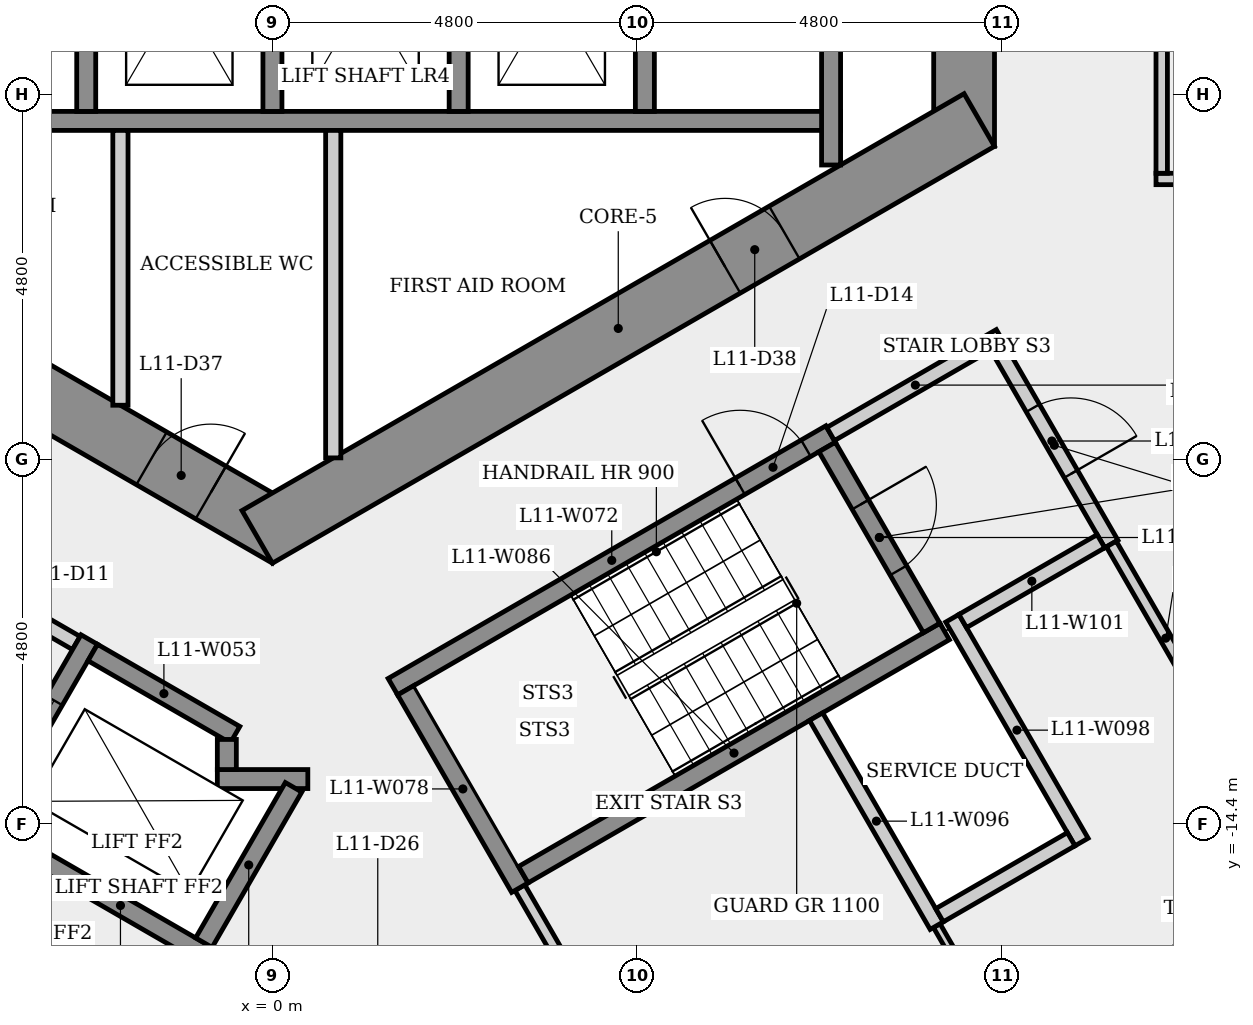
"""IFC4 building model, lengths in metres.
Left out: names, types, materials, properties, quantities, classifications, styles, units other than length and angle.
Written with IfcOpenShell. Run it as: python <this file> out.ifc"""

import sys

from ifc_helpers import new_model, si_unit, direction, frame, frame_2d, origin, origin_2d, place, context, subcontext, project, spatial, rectangle, extrude, element, fill, save


model = new_model("IFC4")
c1 = context("Model", 3, precision=1e-05, world=origin(), true_north=direction((0.0, 1.0)))
c2 = subcontext(c1, "Body", "Model", "MODEL_VIEW")
j1 = project(units=[si_unit("LENGTHUNIT", "METRE"), si_unit("PLANEANGLEUNIT", "RADIAN")], contexts=[c1])
p1 = place(None, origin())
s1 = spatial("IfcSite", under=j1, at=p1, CompositionType="ELEMENT")
p2 = place(p1, origin())
s2 = spatial("IfcBuilding", under=s1, at=p2, CompositionType="ELEMENT")
p3 = place(p2, frame((0.0, 0.0, 45.9)))
s3 = spatial("IfcBuildingStorey", under=s2, at=p3, CompositionType="ELEMENT", Elevation=45.9)
p4 = place(p3, frame((9.1, -5.485, 0.0), z_axis=(0.0, 0.0, 1.0), x_axis=(0.0, 1.0, 0.0)))
e1 = element("IfcWall", 1, at=p4, inside=s3, PredefinedType="SHEAR", context=c2, shape_type="SweptSolid", body=[
    extrude(rectangle(XDim=10.97, YDim=0.8, at=frame_2d((5.485, 0.0))), origin(), (0.0, 0.0, 1.0), 3.4),
])
p5 = place(p4, frame((4.685, 0.0, 0.0)))
e2 = element("IfcOpeningElement", 2, at=p5, cuts=e1, PredefinedType="OPENING", context=c2, shape_type="SweptSolid", body=[
    extrude(rectangle(XDim=1.6, YDim=2.1, at=frame_2d((0.8, 1.05))), frame((0.0, 0.41, 0.0), z_axis=(0.0, -1.0, 0.0), x_axis=(1.0, 0.0, 0.0)), (0.0, 0.0, 1.0), 0.82),
])
p6 = place(p3, frame((-9.3, -5.138, 0.0), z_axis=(0.0, 0.0, 1.0), x_axis=(0.866023993627, -0.500002442456, 0.0)))
e3 = element("IfcWall", 3, at=p6, inside=s3, PredefinedType="SHEAR", context=c2, shape_type="SweptSolid", body=[
    extrude(rectangle(XDim=10.97, YDim=0.8, at=frame_2d((5.485, 0.0))), origin(), (0.0, 0.0, 1.0), 3.4),
])
p7 = place(p6, frame((2.268, 0.0, 0.0)))
e4 = element("IfcOpeningElement", 4, at=p7, cuts=e3, PredefinedType="OPENING", context=c2, shape_type="SweptSolid", body=[
    extrude(rectangle(XDim=0.9, YDim=2.1, at=frame_2d((0.45, 1.05))), frame((0.0, 0.41, 0.0), z_axis=(0.0, -1.0, 0.0), x_axis=(1.0, 0.0, 0.0)), (0.0, 0.0, 1.0), 0.82),
])
p8 = place(p6, frame((8.903, 0.0, 0.0)))
e5 = element("IfcOpeningElement", 5, at=p8, cuts=e3, PredefinedType="OPENING", context=c2, shape_type="SweptSolid", body=[
    extrude(rectangle(XDim=0.9, YDim=2.1, at=frame_2d((0.45, 1.05))), frame((0.0, 0.41, 0.0), z_axis=(0.0, -1.0, 0.0), x_axis=(1.0, 0.0, 0.0)), (0.0, 0.0, 1.0), 0.82),
])
p9 = place(p3, frame((-0.2, -10.623, 0.0), z_axis=(0.0, 0.0, 1.0), x_axis=(0.866023993627, 0.500002442456, 0.0)))
e6 = element("IfcWall", 6, at=p9, inside=s3, PredefinedType="SHEAR", context=c2, shape_type="SweptSolid", body=[
    extrude(rectangle(XDim=10.97, YDim=0.8, at=frame_2d((5.485, 0.0))), origin(), (0.0, 0.0, 1.0), 3.4),
])
p10 = place(p9, frame((7.108, 0.0, 0.0)))
e7 = element("IfcOpeningElement", 7, at=p10, cuts=e6, PredefinedType="OPENING", context=c2, shape_type="SweptSolid", body=[
    extrude(rectangle(XDim=0.9, YDim=2.1, at=frame_2d((0.45, 1.05))), frame((0.0, 0.41, 0.0), z_axis=(0.0, -1.0, 0.0), x_axis=(1.0, 0.0, 0.0)), (0.0, 0.0, 1.0), 0.82),
])
p11 = place(p3, frame((12.016, -16.617, 0.0), z_axis=(0.0, 0.0, 1.0), x_axis=(0.5, -0.866025403784, 0.0)))
e8 = element("IfcColumn", 8, at=p11, inside=s3, PredefinedType="COLUMN", context=c2, shape_type="SweptSolid", body=[
    extrude(rectangle(XDim=1.2, YDim=1.2, at=origin_2d()), origin(), (0.0, 0.0, 1.0), 3.4),
])
p12 = place(p3, frame((-6.435, -9.795, 0.0), z_axis=(0.0, 0.0, 1.0), x_axis=(0.866012907634, -0.500021643343, 0.0)))
e9 = element("IfcWall", 9, at=p12, inside=s3, PredefinedType="PARTITIONING", context=c2, shape_type="SweptSolid", body=[
    extrude(rectangle(XDim=4.45, YDim=0.2, at=frame_2d((2.225, 0.0))), origin(), (0.0, 0.0, 1.0), 3.05),
])
p13 = place(p12, frame((1.675, 0.0, 0.0)))
e10 = element("IfcOpeningElement", 10, at=p13, cuts=e9, PredefinedType="OPENING", context=c2, shape_type="SweptSolid", body=[
    extrude(rectangle(XDim=1.1, YDim=2.1, at=frame_2d((0.55, 1.05))), frame((0.0, 0.11, 0.0), z_axis=(0.0, -1.0, 0.0), x_axis=(1.0, 0.0, 0.0)), (0.0, 0.0, 1.0), 0.22),
])
p14 = place(p3, frame((-7.225, -5.15, 0.0), z_axis=(0.0, 0.0, 1.0), x_axis=(1.0, 0.0, 0.0)))
e11 = element("IfcWall", 11, at=p14, inside=s3, PredefinedType="SHEAR", context=c2, shape_type="SweptSolid", body=[
    extrude(rectangle(XDim=14.7, YDim=0.25, at=frame_2d((7.35, 0.0))), origin(), (0.0, 0.0, 1.0), 3.05),
])
p15 = place(p3, frame((-2.41, -11.974, 0.0), z_axis=(0.0, 0.0, 1.0), x_axis=(-0.500001826776, -0.866024349092, 0.0)))
e12 = element("IfcWall", 12, at=p15, inside=s3, PredefinedType="SHEAR", context=c2, shape_type="SweptSolid", body=[
    extrude(rectangle(XDim=2.95, YDim=0.25, at=frame_2d((1.475, 0.0))), origin(), (0.0, 0.0, 1.0), 3.05),
])
p16 = place(p15, frame((0.925, 0.0, 0.0)))
e13 = element("IfcOpeningElement", 13, at=p16, cuts=e12, PredefinedType="OPENING", context=c2, shape_type="SweptSolid", body=[
    extrude(rectangle(XDim=1.1, YDim=2.1, at=frame_2d((0.55, 1.05))), frame((0.0, 0.135, 0.0), z_axis=(0.0, -1.0, 0.0), x_axis=(1.0, 0.0, 0.0)), (0.0, 0.0, 1.0), 0.27),
])
p17 = place(p3, frame((-2.364, -12.145, 0.0), z_axis=(0.0, 0.0, 1.0), x_axis=(0.86603892542, -0.499976579108, 0.0)))
e14 = element("IfcWall", 14, at=p17, inside=s3, PredefinedType="SHEAR", context=c2, shape_type="SweptSolid", body=[
    extrude(rectangle(XDim=2.162, YDim=0.25, at=frame_2d((1.081, 0.0))), origin(), (0.0, 0.0, 1.0), 3.05),
])
p18 = place(p3, frame((-2.45, -1.925, 0.0), z_axis=(0.0, 0.0, 1.0), x_axis=(0.0, -1.0, 0.0)))
e15 = element("IfcWall", 15, at=p18, inside=s3, PredefinedType="SHEAR", context=c2, shape_type="SweptSolid", body=[
    extrude(rectangle(XDim=3.1, YDim=0.25, at=frame_2d((1.55, 0.0))), origin(), (0.0, 0.0, 1.0), 3.4),
])
p19 = place(p3, frame((-2.0, -5.275, 0.0), z_axis=(0.0, 0.0, 1.0), x_axis=(0.0, -1.0, 0.0)))
e16 = element("IfcWall", 16, at=p19, inside=s3, PredefinedType="PARTITIONING", context=c2, shape_type="SweptSolid", body=[
    extrude(rectangle(XDim=3.616, YDim=0.2, at=frame_2d((1.808, 0.0))), origin(), (0.0, 0.0, 1.0), 3.05),
])
p20 = place(p3, frame((-0.856, -16.133, 0.0), z_axis=(0.0, 0.0, 1.0), x_axis=(-0.866021716278, 0.500006386895, 0.0)))
e17 = element("IfcWall", 17, at=p20, inside=s3, PredefinedType="SHEAR", context=c2, shape_type="SweptSolid", body=[
    extrude(rectangle(XDim=3.3, YDim=0.25, at=frame_2d((1.65, 0.0))), origin(), (0.0, 0.0, 1.0), 3.05),
])
p21 = place(p3, frame((-0.725, -13.81, 0.0), z_axis=(0.0, 0.0, 1.0), x_axis=(1.0, 0.0, 0.0)))
e18 = element("IfcWall", 18, at=p21, inside=s3, PredefinedType="SHEAR", context=c2, shape_type="SweptSolid", body=[
    extrude(rectangle(XDim=1.191, YDim=0.25, at=frame_2d((0.595, 0.0))), origin(), (0.0, 0.0, 1.0), 3.05),
])
p22 = place(p3, frame((-0.6, -13.289, 0.0), z_axis=(0.0, 0.0, 1.0), x_axis=(0.0, -1.0, 0.0)))
e19 = element("IfcWall", 19, at=p22, inside=s3, PredefinedType="SHEAR", context=c2, shape_type="SweptSolid", body=[
    extrude(rectangle(XDim=0.396, YDim=0.25, at=frame_2d((0.198, 0.0))), origin(), (0.0, 0.0, 1.0), 3.4),
])
p23 = place(p3, frame((0.0, -1.925, 0.0), z_axis=(0.0, 0.0, 1.0), x_axis=(0.0, -1.0, 0.0)))
e20 = element("IfcWall", 20, at=p23, inside=s3, PredefinedType="SHEAR", context=c2, shape_type="SweptSolid", body=[
    extrude(rectangle(XDim=3.1, YDim=0.25, at=frame_2d((1.55, 0.0))), origin(), (0.0, 0.0, 1.0), 3.4),
])
p24 = place(p3, frame((0.278, -13.918, 0.0), z_axis=(0.0, 0.0, 1.0), x_axis=(-0.49998806882, -0.866032292145, 0.0)))
e21 = element("IfcWall", 21, at=p24, inside=s3, PredefinedType="SHEAR", context=c2, shape_type="SweptSolid", body=[
    extrude(rectangle(XDim=2.36, YDim=0.25, at=frame_2d((1.18, 0.0))), origin(), (0.0, 0.0, 1.0), 3.4),
])
p25 = place(p3, frame((0.8, -5.275, 0.0), z_axis=(0.0, 0.0, 1.0), x_axis=(0.0, -1.0, 0.0)))
e22 = element("IfcWall", 22, at=p25, inside=s3, PredefinedType="PARTITIONING", context=c2, shape_type="SweptSolid", body=[
    extrude(rectangle(XDim=4.309, YDim=0.2, at=frame_2d((2.155, 0.0))), origin(), (0.0, 0.0, 1.0), 3.05),
])
p26 = place(p3, frame((1.585, -12.595, 0.0), z_axis=(0.0, 0.0, 1.0), x_axis=(0.866036417653, 0.499980922934, 0.0)))
e23 = element("IfcWall", 23, at=p26, inside=s3, PredefinedType="SHEAR", context=c2, shape_type="SweptSolid", body=[
    extrude(rectangle(XDim=6.65, YDim=0.25, at=frame_2d((3.325, 0.0))), origin(), (0.0, 0.0, 1.0), 3.05),
])
p27 = place(p26, frame((5.275, 0.0, 0.0)))
e24 = element("IfcOpeningElement", 24, at=p27, cuts=e23, PredefinedType="OPENING", context=c2, shape_type="SweptSolid", body=[
    extrude(rectangle(XDim=1.0, YDim=2.1, at=frame_2d((0.5, 1.05))), frame((0.0, 0.135, 0.0), z_axis=(0.0, -1.0, 0.0), x_axis=(1.0, 0.0, 0.0)), (0.0, 0.0, 1.0), 0.27),
])
p28 = place(p3, frame((2.45, -1.925, 0.0), z_axis=(0.0, 0.0, 1.0), x_axis=(0.0, -1.0, 0.0)))
e25 = element("IfcWall", 25, at=p28, inside=s3, PredefinedType="SHEAR", context=c2, shape_type="SweptSolid", body=[
    extrude(rectangle(XDim=3.1, YDim=0.25, at=frame_2d((1.55, 0.0))), origin(), (0.0, 0.0, 1.0), 3.4),
])
p29 = place(p3, frame((3.256, -15.239, 0.0), z_axis=(0.0, 0.0, 1.0), x_axis=(0.499990325971, -0.866030989016, 0.0)))
e26 = element("IfcWall", 26, at=p29, inside=s3, PredefinedType="PARTITIONING", context=c2, shape_type="SweptSolid", body=[
    extrude(rectangle(XDim=1.104, YDim=0.15, at=frame_2d((0.552, 0.0))), origin(), (0.0, 0.0, 1.0), 3.05),
])
p30 = place(p3, frame((3.256, -15.239, 0.0), z_axis=(0.0, 0.0, 1.0), x_axis=(-0.50002537861, 0.866010750942, 0.0)))
e27 = element("IfcWall", 27, at=p30, inside=s3, PredefinedType="SHEAR", context=c2, shape_type="SweptSolid", body=[
    extrude(rectangle(XDim=3.0, YDim=0.25, at=frame_2d((1.5, 0.0))), origin(), (0.0, 0.0, 1.0), 3.05),
])
p31 = place(p3, frame((4.9, -1.925, 0.0), z_axis=(0.0, 0.0, 1.0), x_axis=(0.0, -1.0, 0.0)))
e28 = element("IfcWall", 28, at=p31, inside=s3, PredefinedType="SHEAR", context=c2, shape_type="SweptSolid", body=[
    extrude(rectangle(XDim=3.1, YDim=0.25, at=frame_2d((1.55, 0.0))), origin(), (0.0, 0.0, 1.0), 3.4),
])
p32 = place(p3, frame((3.301, -15.068, 0.0), z_axis=(0.0, 0.0, 1.0), x_axis=(0.866035036182, 0.499983315828, 0.0)))
e29 = element("IfcWall", 29, at=p32, inside=s3, PredefinedType="SHEAR", context=c2, shape_type="SweptSolid", body=[
    extrude(rectangle(XDim=6.4, YDim=0.25, at=frame_2d((3.2, 0.0))), origin(), (0.0, 0.0, 1.0), 3.05),
])
p33 = place(p3, frame((7.298, -9.441, 0.0), z_axis=(0.0, 0.0, 1.0), x_axis=(0.500034990121, -0.866005201286, 0.0)))
e30 = element("IfcWall", 30, at=p33, inside=s3, PredefinedType="SHEAR", context=c2, shape_type="SweptSolid", body=[
    extrude(rectangle(XDim=2.75, YDim=0.25, at=frame_2d((1.375, 0.0))), origin(), (0.0, 0.0, 1.0), 3.05),
])
p34 = place(p33, frame((0.875, 0.0, 0.0)))
e31 = element("IfcOpeningElement", 31, at=p34, cuts=e30, PredefinedType="OPENING", context=c2, shape_type="SweptSolid", body=[
    extrude(rectangle(XDim=1.0, YDim=2.1, at=frame_2d((0.5, 1.05))), frame((0.0, 0.135, 0.0), z_axis=(0.0, -1.0, 0.0), x_axis=(1.0, 0.0, 0.0)), (0.0, 0.0, 1.0), 0.27),
])
p35 = place(p3, frame((7.344, -9.27, 0.0), z_axis=(0.0, 0.0, 1.0), x_axis=(0.866005588531, 0.500034319456, 0.0)))
e32 = element("IfcWall", 32, at=p35, inside=s3, PredefinedType="PARTITIONING", context=c2, shape_type="SweptSolid", body=[
    extrude(rectangle(XDim=2.575, YDim=0.2, at=frame_2d((1.288, 0.0))), origin(), (0.0, 0.0, 1.0), 3.05),
])
p36 = place(p3, frame((7.35, -1.925, 0.0), z_axis=(0.0, 0.0, 1.0), x_axis=(0.0, -1.0, 0.0)))
e33 = element("IfcWall", 33, at=p36, inside=s3, PredefinedType="SHEAR", context=c2, shape_type="SweptSolid", body=[
    extrude(rectangle(XDim=3.805, YDim=0.25, at=frame_2d((1.903, 0.0))), origin(), (0.0, 0.0, 1.0), 3.05),
])
p37 = place(p3, frame((8.74, -15.738, 0.0), z_axis=(0.0, 0.0, 1.0), x_axis=(0.500001913541, -0.866024298998, 0.0)))
e34 = element("IfcWall", 34, at=p37, inside=s3, PredefinedType="PARTITIONING", context=c2, shape_type="SweptSolid", body=[
    extrude(rectangle(XDim=3.025, YDim=0.1, at=frame_2d((1.512, 0.0))), origin(), (0.0, 0.0, 1.0), 3.05),
])
p38 = place(p3, frame((8.74, -15.739, 0.0), z_axis=(0.0, 0.0, 1.0), x_axis=(-0.500017526161, 0.866015284814, 0.0)))
e35 = element("IfcWall", 35, at=p38, inside=s3, PredefinedType="PLUMBINGWALL", context=c2, shape_type="SweptSolid", body=[
    extrude(rectangle(XDim=3.175, YDim=0.2, at=frame_2d((1.588, 0.0))), origin(), (0.0, 0.0, 1.0), 3.05),
])
p39 = place(p3, frame((8.945, -11.694, 0.0), z_axis=(0.0, 0.0, 1.0), x_axis=(0.500062241894, -0.865989465428, 0.0)))
e36 = element("IfcWall", 36, at=p39, inside=s3, PredefinedType="PLUMBINGWALL", context=c2, shape_type="SweptSolid", body=[
    extrude(rectangle(XDim=3.4, YDim=0.2, at=frame_2d((1.7, 0.0))), origin(), (0.0, 0.0, 1.0), 3.05),
])
p40 = place(p3, frame((9.537, -8.119, 0.0), z_axis=(0.0, 0.0, 1.0), x_axis=(0.499990139034, -0.866031096941, 0.0)))
e37 = element("IfcWall", 37, at=p40, inside=s3, PredefinedType="PARTITIONING", context=c2, shape_type="SweptSolid", body=[
    extrude(rectangle(XDim=3.0, YDim=0.2, at=frame_2d((1.5, 0.0))), origin(), (0.0, 0.0, 1.0), 3.05),
])
p41 = place(p40, frame((0.935, 0.0, 0.0)))
e38 = element("IfcOpeningElement", 38, at=p41, cuts=e37, PredefinedType="OPENING", context=c2, shape_type="SweptSolid", body=[
    extrude(rectangle(XDim=1.0, YDim=2.1, at=frame_2d((0.5, 1.05))), frame((0.0, 0.11, 0.0), z_axis=(0.0, -1.0, 0.0), x_axis=(1.0, 0.0, 0.0)), (0.0, 0.0, 1.0), 0.22),
])
p42 = place(p3, frame((10.509, -14.602, 0.0), z_axis=(0.0, 0.0, 1.0), x_axis=(-0.866010750942, -0.50002537861, 0.0)))
e39 = element("IfcWall", 39, at=p42, inside=s3, PredefinedType="PLUMBINGWALL", context=c2, shape_type="SweptSolid", body=[
    extrude(rectangle(XDim=2.0, YDim=0.2, at=frame_2d((1.0, 0.0))), origin(), (0.0, 0.0, 1.0), 3.05),
])
p43 = place(p3, frame((10.901, -10.681, 0.0), z_axis=(0.0, 0.0, 1.0), x_axis=(-0.866009402589, -0.500027713859, 0.0)))
e40 = element("IfcWall", 40, at=p43, inside=s3, PredefinedType="PARTITIONING", context=c2, shape_type="SweptSolid", body=[
    extrude(rectangle(XDim=2.1, YDim=0.2, at=frame_2d((1.05, 0.0))), origin(), (0.0, 0.0, 1.0), 3.05),
])
p44 = place(p3, frame((11.625, -5.914, 0.0), z_axis=(0.0, 0.0, 1.0), x_axis=(1.0, 0.0, 0.0)))
e41 = element("IfcWall", 41, at=p44, inside=s3, PredefinedType="PARTITIONING", context=c2, shape_type="SweptSolid", body=[
    extrude(rectangle(XDim=5.047, YDim=0.15, at=frame_2d((2.523, 0.0))), origin(), (0.0, 0.0, 1.0), 3.05),
])
p45 = place(p3, frame((11.7, 5.914, 0.0), z_axis=(0.0, 0.0, 1.0), x_axis=(0.0, -1.0, 0.0)))
e42 = element("IfcWall", 42, at=p45, inside=s3, PredefinedType="PARTITIONING", context=c2, shape_type="SweptSolid", body=[
    extrude(rectangle(XDim=11.753, YDim=0.15, at=frame_2d((5.877, 0.0))), origin(), (0.0, 0.0, 1.0), 3.05),
])
p46 = place(p45, frame((5.377, 0.0, 0.0)))
e43 = element("IfcOpeningElement", 43, at=p46, cuts=e42, PredefinedType="OPENING", context=c2, shape_type="SweptSolid", body=[
    extrude(rectangle(XDim=1.0, YDim=2.1, at=frame_2d((0.5, 1.05))), frame((0.0, 0.085, 0.0), z_axis=(0.0, -1.0, 0.0), x_axis=(1.0, 0.0, 0.0)), (0.0, 0.0, 1.0), 0.17),
])
p47 = place(p3, frame((12.468, -13.195, 0.0), z_axis=(0.0, 0.0, 1.0), x_axis=(-0.499956322556, 0.8660506195, 0.0)))
e44 = element("IfcWall", 44, at=p47, inside=s3, PredefinedType="PARTITIONING", context=c2, shape_type="SweptSolid", body=[
    extrude(rectangle(XDim=2.862, YDim=0.15, at=frame_2d((1.431, 0.0))), origin(), (0.0, 0.0, 1.0), 3.05),
])
p48 = place(p16, origin())
e45 = element("IfcDoor", 45, at=p48, inside=s3, OperationType="SLIDING_TO_LEFT", PredefinedType="DOOR", context=c2, shape_type="SweptSolid", body=[
    extrude(rectangle(XDim=1.1, YDim=2.1, at=frame_2d((0.55, 1.05))), frame((0.0, 0.025, 0.0), z_axis=(0.0, -1.0, 0.0), x_axis=(1.0, 0.0, 0.0)), (0.0, 0.0, 1.0), 0.05),
])
fill(e13, e45)
p49 = place(p27, origin())
e46 = element("IfcDoor", 46, at=p49, inside=s3, OperationType="SINGLE_SWING_LEFT", PredefinedType="DOOR", context=c2, shape_type="SweptSolid", body=[
    extrude(rectangle(XDim=1.0, YDim=2.1, at=frame_2d((0.5, 1.05))), frame((0.0, 0.025, 0.0), z_axis=(0.0, -1.0, 0.0), x_axis=(1.0, 0.0, 0.0)), (0.0, 0.0, 1.0), 0.05),
])
fill(e24, e46)
p50 = place(p41, origin())
e47 = element("IfcDoor", 47, at=p50, inside=s3, OperationType="SINGLE_SWING_RIGHT", PredefinedType="DOOR", context=c2, shape_type="SweptSolid", body=[
    extrude(rectangle(XDim=1.0, YDim=2.1, at=frame_2d((0.5, 1.05))), frame((0.0, 0.025, 0.0), z_axis=(0.0, -1.0, 0.0), x_axis=(1.0, 0.0, 0.0)), (0.0, 0.0, 1.0), 0.05),
])
fill(e38, e47)
p51 = place(p34, origin())
e48 = element("IfcDoor", 48, at=p51, inside=s3, OperationType="SINGLE_SWING_LEFT", PredefinedType="DOOR", context=c2, shape_type="SweptSolid", body=[
    extrude(rectangle(XDim=1.0, YDim=2.1, at=frame_2d((0.5, 1.05))), frame((0.0, 0.025, 0.0), z_axis=(0.0, -1.0, 0.0), x_axis=(1.0, 0.0, 0.0)), (0.0, 0.0, 1.0), 0.05),
])
fill(e31, e48)
p52 = place(p8, origin())
e49 = element("IfcDoor", 49, at=p52, inside=s3, OperationType="SINGLE_SWING_RIGHT", PredefinedType="DOOR", context=c2, shape_type="SweptSolid", body=[
    extrude(rectangle(XDim=0.9, YDim=2.1, at=frame_2d((0.45, 1.05))), frame((0.0, 0.025, 0.0), z_axis=(0.0, -1.0, 0.0), x_axis=(1.0, 0.0, 0.0)), (0.0, 0.0, 1.0), 0.05),
])
fill(e5, e49)
p53 = place(p10, origin())
e50 = element("IfcDoor", 50, at=p53, inside=s3, OperationType="SINGLE_SWING_LEFT", PredefinedType="DOOR", context=c2, shape_type="SweptSolid", body=[
    extrude(rectangle(XDim=0.9, YDim=2.1, at=frame_2d((0.45, 1.05))), frame((0.0, 0.025, 0.0), z_axis=(0.0, -1.0, 0.0), x_axis=(1.0, 0.0, 0.0)), (0.0, 0.0, 1.0), 0.05),
])
fill(e7, e50)
save(model, sys.argv[1])
